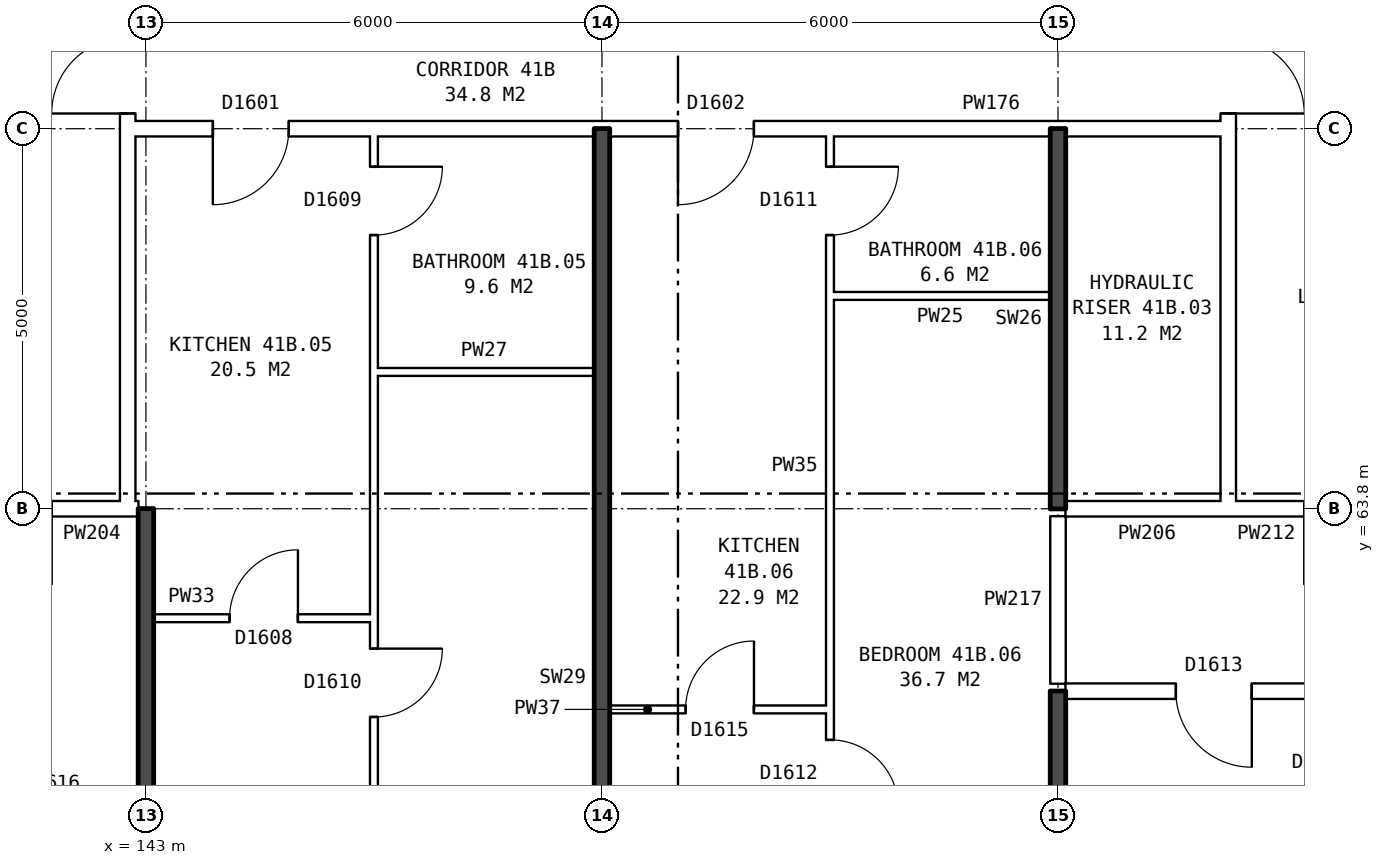
"""IFC4 building model, lengths in metres.
Left out: names, types, materials, properties, quantities, classifications, styles, units other than length and angle.
Written with IfcOpenShell. Run it as: python <this file> out.ifc"""

import sys

from ifc_helpers import new_model, si_unit, direction, frame, frame_2d, origin, place, context, subcontext, project, spatial, rectangle, extrude, element, fill, save


model = new_model("IFC4")
c1 = context("Model", 3, precision=1e-05, world=origin(), true_north=direction((0.0, 1.0)))
c2 = subcontext(c1, "Body", "Model", "MODEL_VIEW")
j1 = project(units=[si_unit("LENGTHUNIT", "METRE"), si_unit("PLANEANGLEUNIT", "RADIAN")], contexts=[c1])
p1 = place(None, origin())
s1 = spatial("IfcSite", under=j1, at=p1, CompositionType="ELEMENT")
p2 = place(p1, origin())
s2 = spatial("IfcBuilding", under=s1, at=p2, CompositionType="ELEMENT")
p3 = place(p2, frame((0.0, 0.0, 148.5)))
s3 = spatial("IfcBuildingStorey", under=s2, at=p3, CompositionType="ELEMENT", Elevation=148.5)
p4 = place(p3, frame((142.76, 63.9, 0.0), z_axis=(0.0, 0.0, 1.0), x_axis=(0.0, 1.0, 0.0)))
e1 = element("IfcWall", 1, at=p4, inside=s3, PredefinedType="PARTITIONING", context=c2, shape_type="SweptSolid", body=[
    extrude(rectangle(XDim=12.2, YDim=0.2, at=frame_2d((6.1, 0.0))), origin(), (0.0, 0.0, 1.0), 2.85),
])
p5 = place(p4, frame((5.1, 0.0, 0.0)))
e2 = element("IfcOpeningElement", 2, at=p5, cuts=e1, PredefinedType="OPENING", context=c2, shape_type="SweptSolid", body=[
    extrude(rectangle(XDim=2.0, YDim=2.1, at=frame_2d((1.0, 1.05))), frame((0.0, 0.11, 0.0), z_axis=(0.0, -1.0, 0.0), x_axis=(1.0, 0.0, 0.0)), (0.0, 0.0, 1.0), 0.22),
])
p6 = place(p3, frame((157.24, 63.9, 0.0), z_axis=(0.0, 0.0, 1.0), x_axis=(0.0, 1.0, 0.0)))
e3 = element("IfcWall", 3, at=p6, inside=s3, PredefinedType="PARTITIONING", context=c2, shape_type="SweptSolid", body=[
    extrude(rectangle(XDim=12.2, YDim=0.2, at=frame_2d((6.1, 0.0))), origin(), (0.0, 0.0, 1.0), 2.85),
])
p7 = place(p6, frame((5.1, 0.0, 0.0)))
e4 = element("IfcOpeningElement", 4, at=p7, cuts=e3, PredefinedType="OPENING", context=c2, shape_type="SweptSolid", body=[
    extrude(rectangle(XDim=2.0, YDim=2.1, at=frame_2d((1.0, 1.05))), frame((0.0, 0.11, 0.0), z_axis=(0.0, -1.0, 0.0), x_axis=(1.0, 0.0, 0.0)), (0.0, 0.0, 1.0), 0.22),
])
p8 = place(p3, frame((149.1, 61.16, 0.0), z_axis=(0.0, 0.0, 1.0), x_axis=(1.0, 0.0, 0.0)))
e5 = element("IfcWall", 5, at=p8, inside=s3, PredefinedType="PARTITIONING", context=c2, shape_type="SweptSolid", body=[
    extrude(rectangle(XDim=2.9, YDim=0.1, at=frame_2d((1.45, 0.0))), origin(), (0.0, 0.0, 1.0), 2.85),
])
p9 = place(p8, frame((1.0, 0.0, 0.0)))
e6 = element("IfcOpeningElement", 6, at=p9, cuts=e5, PredefinedType="OPENING", context=c2, shape_type="SweptSolid", body=[
    extrude(rectangle(XDim=0.9, YDim=2.1, at=frame_2d((0.45, 1.05))), frame((0.0, 0.06, 0.0), z_axis=(0.0, -1.0, 0.0), x_axis=(1.0, 0.0, 0.0)), (0.0, 0.0, 1.0), 0.12),
])
p10 = place(p3, frame((155.1, 61.4, 0.0), z_axis=(0.0, 0.0, 1.0), x_axis=(1.0, 0.0, 0.0)))
e7 = element("IfcWall", 7, at=p10, inside=s3, PredefinedType="PARTITIONING", context=c2, shape_type="SweptSolid", body=[
    extrude(rectangle(XDim=16.04, YDim=0.2, at=frame_2d((8.02, 0.0))), origin(), (0.0, 0.0, 1.0), 2.85),
])
p11 = place(p10, frame((1.45, 0.0, 0.0)))
e8 = element("IfcOpeningElement", 8, at=p11, cuts=e7, PredefinedType="OPENING", context=c2, shape_type="SweptSolid", body=[
    extrude(rectangle(XDim=1.0, YDim=2.1, at=frame_2d((0.5, 1.05))), frame((0.0, 0.11, 0.0), z_axis=(0.0, -1.0, 0.0), x_axis=(1.0, 0.0, 0.0)), (0.0, 0.0, 1.0), 0.22),
])
p12 = place(p10, frame((8.4, 0.0, 0.0)))
e9 = element("IfcOpeningElement", 9, at=p12, cuts=e7, PredefinedType="OPENING", context=c2, shape_type="SweptSolid", body=[
    extrude(rectangle(XDim=1.0, YDim=2.1, at=frame_2d((0.5, 1.05))), frame((0.0, 0.11, 0.0), z_axis=(0.0, -1.0, 0.0), x_axis=(1.0, 0.0, 0.0)), (0.0, 0.0, 1.0), 0.22),
])
p13 = place(p3, frame((143.1, 62.36, 0.0), z_axis=(0.0, 0.0, 1.0), x_axis=(1.0, 0.0, 0.0)))
e10 = element("IfcWall", 10, at=p13, inside=s3, PredefinedType="PARTITIONING", context=c2, shape_type="SweptSolid", body=[
    extrude(rectangle(XDim=2.9, YDim=0.1, at=frame_2d((1.45, 0.0))), origin(), (0.0, 0.0, 1.0), 2.85),
])
p14 = place(p13, frame((1.0, 0.0, 0.0)))
e11 = element("IfcOpeningElement", 11, at=p14, cuts=e10, PredefinedType="OPENING", context=c2, shape_type="SweptSolid", body=[
    extrude(rectangle(XDim=0.9, YDim=2.1, at=frame_2d((0.45, 1.05))), frame((0.0, 0.06, 0.0), z_axis=(0.0, -1.0, 0.0), x_axis=(1.0, 0.0, 0.0)), (0.0, 0.0, 1.0), 0.12),
])
p15 = place(p3, frame((139.76, 63.8, 0.0), z_axis=(0.0, 0.0, 1.0), x_axis=(1.0, 0.0, 0.0)))
e12 = element("IfcWall", 12, at=p15, inside=s3, PredefinedType="PARTITIONING", context=c2, shape_type="SweptSolid", body=[
    extrude(rectangle(XDim=3.0, YDim=0.2, at=frame_2d((1.5, 0.0))), origin(), (0.0, 0.0, 1.0), 2.85),
])
p16 = place(p15, frame((1.0, 0.0, 0.0)))
e13 = element("IfcOpeningElement", 13, at=p16, cuts=e12, PredefinedType="OPENING", context=c2, shape_type="SweptSolid", body=[
    extrude(rectangle(XDim=1.0, YDim=2.1, at=frame_2d((0.5, 1.05))), frame((0.0, 0.11, 0.0), z_axis=(0.0, -1.0, 0.0), x_axis=(1.0, 0.0, 0.0)), (0.0, 0.0, 1.0), 0.22),
])
p17 = place(p3, frame((142.76, 63.8, 0.0), z_axis=(0.0, 0.0, 1.0), x_axis=(1.0, 0.0, 0.0)))
e14 = element("IfcWall", 14, at=p17, inside=s3, PredefinedType="PARTITIONING", context=c2, shape_type="SweptSolid", body=[
    extrude(rectangle(XDim=0.14, YDim=0.2, at=frame_2d((0.07, 0.0))), origin(), (0.0, 0.0, 1.0), 2.85),
])
p18 = place(p3, frame((155.1, 63.8, 0.0), z_axis=(0.0, 0.0, 1.0), x_axis=(1.0, 0.0, 0.0)))
e15 = element("IfcWall", 15, at=p18, inside=s3, PredefinedType="PARTITIONING", context=c2, shape_type="SweptSolid", body=[
    extrude(rectangle(XDim=2.14, YDim=0.2, at=frame_2d((1.07, 0.0))), origin(), (0.0, 0.0, 1.0), 2.85),
])
p19 = place(p3, frame((157.24, 63.8, 0.0), z_axis=(0.0, 0.0, 1.0), x_axis=(1.0, 0.0, 0.0)))
e16 = element("IfcWall", 16, at=p19, inside=s3, PredefinedType="PARTITIONING", context=c2, shape_type="SweptSolid", body=[
    extrude(rectangle(XDim=3.0, YDim=0.2, at=frame_2d((1.5, 0.0))), origin(), (0.0, 0.0, 1.0), 2.85),
])
p20 = place(p19, frame((1.0, 0.0, 0.0)))
e17 = element("IfcOpeningElement", 17, at=p20, cuts=e16, PredefinedType="OPENING", context=c2, shape_type="SweptSolid", body=[
    extrude(rectangle(XDim=1.0, YDim=2.1, at=frame_2d((0.5, 1.05))), frame((0.0, 0.11, 0.0), z_axis=(0.0, -1.0, 0.0), x_axis=(1.0, 0.0, 0.0)), (0.0, 0.0, 1.0), 0.22),
])
for number, where, z_axis, x_axis in (
    (18, (146.0, 65.6, 0.0), (0.0, 0.0, 1.0), (1.0, 0.0, 0.0)),
    (19, (152.0, 66.6, 0.0), (0.0, 0.0, 1.0), (1.0, 0.0, 0.0)),
):
    element("IfcWall", number, at=place(p3, frame(where, z_axis=z_axis, x_axis=x_axis)), inside=s3, PredefinedType="PARTITIONING", context=c2, shape_type="SweptSolid", body=[
        extrude(rectangle(XDim=2.9, YDim=0.1, at=frame_2d((1.45, 0.0))), origin(), (0.0, 0.0, 1.0), 2.85),
    ])
p21 = place(p3, frame((142.76, 68.8, 0.0), z_axis=(0.0, 0.0, 1.0), x_axis=(1.0, 0.0, 0.0)))
e20 = element("IfcWall", 20, at=p21, inside=s3, PredefinedType="PARTITIONING", context=c2, shape_type="SweptSolid", body=[
    extrude(rectangle(XDim=14.48, YDim=0.2, at=frame_2d((7.24, 0.0))), origin(), (0.0, 0.0, 1.0), 2.85),
])
p22 = place(p21, frame((1.12, 0.0, 0.0)))
e21 = element("IfcOpeningElement", 21, at=p22, cuts=e20, PredefinedType="OPENING", context=c2, shape_type="SweptSolid", body=[
    extrude(rectangle(XDim=1.0, YDim=2.1, at=frame_2d((0.5, 1.05))), frame((0.0, 0.11, 0.0), z_axis=(0.0, -1.0, 0.0), x_axis=(1.0, 0.0, 0.0)), (0.0, 0.0, 1.0), 0.22),
])
p23 = place(p21, frame((7.24, 0.0, 0.0)))
e22 = element("IfcOpeningElement", 22, at=p23, cuts=e20, PredefinedType="OPENING", context=c2, shape_type="SweptSolid", body=[
    extrude(rectangle(XDim=1.0, YDim=2.1, at=frame_2d((0.5, 1.05))), frame((0.0, 0.11, 0.0), z_axis=(0.0, -1.0, 0.0), x_axis=(1.0, 0.0, 0.0)), (0.0, 0.0, 1.0), 0.22),
])
p24 = place(p3, frame((143.0, 54.36, 0.0), z_axis=(0.0, 0.0, 1.0), x_axis=(0.0, 1.0, 0.0)))
e23 = element("IfcWall", 23, at=p24, inside=s3, PredefinedType="SOLIDWALL", context=c2, shape_type="SweptSolid", body=[
    extrude(rectangle(XDim=9.44, YDim=0.2, at=frame_2d((4.72, 0.0))), origin(), (0.0, 0.0, 1.0), 2.85),
])
p25 = place(p3, frame((146.0, 54.36, 0.0), z_axis=(0.0, 0.0, 1.0), x_axis=(0.0, 1.0, 0.0)))
e24 = element("IfcWall", 24, at=p25, inside=s3, PredefinedType="PARTITIONING", context=c2, shape_type="SweptSolid", body=[
    extrude(rectangle(XDim=14.34, YDim=0.1, at=frame_2d((7.17, 0.0))), origin(), (0.0, 0.0, 1.0), 2.85),
])
p26 = place(p25, frame((6.7, 0.0, 0.0)))
e25 = element("IfcOpeningElement", 25, at=p26, cuts=e24, PredefinedType="OPENING", context=c2, shape_type="SweptSolid", body=[
    extrude(rectangle(XDim=0.9, YDim=2.1, at=frame_2d((0.45, 1.05))), frame((0.0, 0.06, 0.0), z_axis=(0.0, -1.0, 0.0), x_axis=(1.0, 0.0, 0.0)), (0.0, 0.0, 1.0), 0.12),
])
p27 = place(p25, frame((13.04, 0.0, 0.0)))
e26 = element("IfcOpeningElement", 26, at=p27, cuts=e24, PredefinedType="OPENING", context=c2, shape_type="SweptSolid", body=[
    extrude(rectangle(XDim=0.9, YDim=2.1, at=frame_2d((0.45, 1.05))), frame((0.0, 0.06, 0.0), z_axis=(0.0, -1.0, 0.0), x_axis=(1.0, 0.0, 0.0)), (0.0, 0.0, 1.0), 0.12),
])
p28 = place(p3, frame((149.0, 54.36, 0.0), z_axis=(0.0, 0.0, 1.0), x_axis=(0.0, 1.0, 0.0)))
e27 = element("IfcWall", 27, at=p28, inside=s3, PredefinedType="SOLIDWALL", context=c2, shape_type="SweptSolid", body=[
    extrude(rectangle(XDim=14.44, YDim=0.2, at=frame_2d((7.22, 0.0))), origin(), (0.0, 0.0, 1.0), 2.85),
])
p29 = place(p3, frame((152.0, 54.36, 0.0), z_axis=(0.0, 0.0, 1.0), x_axis=(0.0, 1.0, 0.0)))
e28 = element("IfcWall", 28, at=p29, inside=s3, PredefinedType="PARTITIONING", context=c2, shape_type="SweptSolid", body=[
    extrude(rectangle(XDim=14.34, YDim=0.1, at=frame_2d((7.17, 0.0))), origin(), (0.0, 0.0, 1.0), 2.85),
])
p30 = place(p29, frame((5.5, 0.0, 0.0)))
e29 = element("IfcOpeningElement", 29, at=p30, cuts=e28, PredefinedType="OPENING", context=c2, shape_type="SweptSolid", body=[
    extrude(rectangle(XDim=0.9, YDim=2.1, at=frame_2d((0.45, 1.05))), frame((0.0, 0.06, 0.0), z_axis=(0.0, -1.0, 0.0), x_axis=(1.0, 0.0, 0.0)), (0.0, 0.0, 1.0), 0.12),
])
p31 = place(p29, frame((13.04, 0.0, 0.0)))
e30 = element("IfcOpeningElement", 30, at=p31, cuts=e28, PredefinedType="OPENING", context=c2, shape_type="SweptSolid", body=[
    extrude(rectangle(XDim=0.9, YDim=2.1, at=frame_2d((0.45, 1.05))), frame((0.0, 0.06, 0.0), z_axis=(0.0, -1.0, 0.0), x_axis=(1.0, 0.0, 0.0)), (0.0, 0.0, 1.0), 0.12),
])
p32 = place(p3, frame((155.0, 54.36, 0.0), z_axis=(0.0, 0.0, 1.0), x_axis=(0.0, 1.0, 0.0)))
e31 = element("IfcWall", 31, at=p32, inside=s3, PredefinedType="SOLIDWALL", context=c2, shape_type="SweptSolid", body=[
    extrude(rectangle(XDim=7.04, YDim=0.2, at=frame_2d((3.52, 0.0))), origin(), (0.0, 0.0, 1.0), 2.85),
])
p33 = place(p3, frame((155.0, 61.5, 0.0), z_axis=(0.0, 0.0, 1.0), x_axis=(0.0, 1.0, 0.0)))
e32 = element("IfcWall", 32, at=p33, inside=s3, PredefinedType="PARTITIONING", context=c2, shape_type="SweptSolid", body=[
    extrude(rectangle(XDim=2.2, YDim=0.2, at=frame_2d((1.1, 0.0))), origin(), (0.0, 0.0, 1.0), 2.85),
])
p34 = place(p3, frame((155.0, 63.8, 0.0), z_axis=(0.0, 0.0, 1.0), x_axis=(0.0, 1.0, 0.0)))
e33 = element("IfcWall", 33, at=p34, inside=s3, PredefinedType="SOLIDWALL", context=c2, shape_type="SweptSolid", body=[
    extrude(rectangle(XDim=5.0, YDim=0.2, at=frame_2d((2.5, 0.0))), origin(), (0.0, 0.0, 1.0), 2.85),
])
p35 = place(p5, origin())
e34 = element("IfcDoor", 34, at=p35, inside=s3, OperationType="DOUBLE_DOOR_SINGLE_SWING", PredefinedType="DOOR", context=c2, shape_type="SweptSolid", body=[
    extrude(rectangle(XDim=2.0, YDim=2.1, at=frame_2d((1.0, 1.05))), frame((0.0, 0.025, 0.0), z_axis=(0.0, -1.0, 0.0), x_axis=(1.0, 0.0, 0.0)), (0.0, 0.0, 1.0), 0.05),
])
fill(e2, e34)
p36 = place(p7, frame((2.0, 0.0, 0.0), z_axis=(0.0, 0.0, 1.0), x_axis=(-1.0, 0.0, 0.0)))
e35 = element("IfcDoor", 35, at=p36, inside=s3, OperationType="DOUBLE_DOOR_SINGLE_SWING", PredefinedType="DOOR", context=c2, shape_type="SweptSolid", body=[
    extrude(rectangle(XDim=2.0, YDim=2.1, at=frame_2d((1.0, 1.05))), frame((0.0, 0.025, 0.0), z_axis=(0.0, -1.0, 0.0), x_axis=(1.0, 0.0, 0.0)), (0.0, 0.0, 1.0), 0.05),
])
fill(e4, e35)
p37 = place(p26, frame((0.9, 0.0, 0.0), z_axis=(0.0, 0.0, 1.0), x_axis=(-1.0, 0.0, 0.0)))
e36 = element("IfcDoor", 36, at=p37, inside=s3, OperationType="SINGLE_SWING_LEFT", PredefinedType="DOOR", context=c2, shape_type="SweptSolid", body=[
    extrude(rectangle(XDim=0.9, YDim=2.1, at=frame_2d((0.45, 1.05))), frame((0.0, 0.025, 0.0), z_axis=(0.0, -1.0, 0.0), x_axis=(1.0, 0.0, 0.0)), (0.0, 0.0, 1.0), 0.05),
])
fill(e25, e36)
p38 = place(p22, frame((1.0, 0.0, 0.0), z_axis=(0.0, 0.0, 1.0), x_axis=(-1.0, 0.0, 0.0)))
e37 = element("IfcDoor", 37, at=p38, inside=s3, OperationType="SINGLE_SWING_RIGHT", PredefinedType="DOOR", context=c2, shape_type="SweptSolid", body=[
    extrude(rectangle(XDim=1.0, YDim=2.1, at=frame_2d((0.5, 1.05))), frame((0.0, 0.025, 0.0), z_axis=(0.0, -1.0, 0.0), x_axis=(1.0, 0.0, 0.0)), (0.0, 0.0, 1.0), 0.05),
])
fill(e21, e37)
p39 = place(p14, origin())
e38 = element("IfcDoor", 38, at=p39, inside=s3, OperationType="SINGLE_SWING_RIGHT", PredefinedType="DOOR", context=c2, shape_type="SweptSolid", body=[
    extrude(rectangle(XDim=0.9, YDim=2.1, at=frame_2d((0.45, 1.05))), frame((0.0, 0.025, 0.0), z_axis=(0.0, -1.0, 0.0), x_axis=(1.0, 0.0, 0.0)), (0.0, 0.0, 1.0), 0.05),
])
fill(e11, e38)
p40 = place(p27, frame((0.9, 0.0, 0.0), z_axis=(0.0, 0.0, 1.0), x_axis=(-1.0, 0.0, 0.0)))
e39 = element("IfcDoor", 39, at=p40, inside=s3, OperationType="SINGLE_SWING_LEFT", PredefinedType="DOOR", context=c2, shape_type="SweptSolid", body=[
    extrude(rectangle(XDim=0.9, YDim=2.1, at=frame_2d((0.45, 1.05))), frame((0.0, 0.025, 0.0), z_axis=(0.0, -1.0, 0.0), x_axis=(1.0, 0.0, 0.0)), (0.0, 0.0, 1.0), 0.05),
])
fill(e26, e39)
p41 = place(p30, frame((0.9, 0.0, 0.0), z_axis=(0.0, 0.0, 1.0), x_axis=(-1.0, 0.0, 0.0)))
e40 = element("IfcDoor", 40, at=p41, inside=s3, OperationType="SINGLE_SWING_RIGHT", PredefinedType="DOOR", context=c2, shape_type="SweptSolid", body=[
    extrude(rectangle(XDim=0.9, YDim=2.1, at=frame_2d((0.45, 1.05))), frame((0.0, 0.025, 0.0), z_axis=(0.0, -1.0, 0.0), x_axis=(1.0, 0.0, 0.0)), (0.0, 0.0, 1.0), 0.05),
])
fill(e29, e40)
p42 = place(p23, frame((1.0, 0.0, 0.0), z_axis=(0.0, 0.0, 1.0), x_axis=(-1.0, 0.0, 0.0)))
e41 = element("IfcDoor", 41, at=p42, inside=s3, OperationType="SINGLE_SWING_RIGHT", PredefinedType="DOOR", context=c2, shape_type="SweptSolid", body=[
    extrude(rectangle(XDim=1.0, YDim=2.1, at=frame_2d((0.5, 1.05))), frame((0.0, 0.025, 0.0), z_axis=(0.0, -1.0, 0.0), x_axis=(1.0, 0.0, 0.0)), (0.0, 0.0, 1.0), 0.05),
])
fill(e22, e41)
p43 = place(p9, origin())
e42 = element("IfcDoor", 42, at=p43, inside=s3, OperationType="SINGLE_SWING_RIGHT", PredefinedType="DOOR", context=c2, shape_type="SweptSolid", body=[
    extrude(rectangle(XDim=0.9, YDim=2.1, at=frame_2d((0.45, 1.05))), frame((0.0, 0.025, 0.0), z_axis=(0.0, -1.0, 0.0), x_axis=(1.0, 0.0, 0.0)), (0.0, 0.0, 1.0), 0.05),
])
fill(e6, e42)
p44 = place(p31, frame((0.9, 0.0, 0.0), z_axis=(0.0, 0.0, 1.0), x_axis=(-1.0, 0.0, 0.0)))
e43 = element("IfcDoor", 43, at=p44, inside=s3, OperationType="SINGLE_SWING_LEFT", PredefinedType="DOOR", context=c2, shape_type="SweptSolid", body=[
    extrude(rectangle(XDim=0.9, YDim=2.1, at=frame_2d((0.45, 1.05))), frame((0.0, 0.025, 0.0), z_axis=(0.0, -1.0, 0.0), x_axis=(1.0, 0.0, 0.0)), (0.0, 0.0, 1.0), 0.05),
])
fill(e30, e43)
p45 = place(p11, frame((1.0, 0.0, 0.0), z_axis=(0.0, 0.0, 1.0), x_axis=(-1.0, 0.0, 0.0)))
e44 = element("IfcDoor", 44, at=p45, inside=s3, OperationType="SINGLE_SWING_LEFT", PredefinedType="DOOR", context=c2, shape_type="SweptSolid", body=[
    extrude(rectangle(XDim=1.0, YDim=2.1, at=frame_2d((0.5, 1.05))), frame((0.0, 0.025, 0.0), z_axis=(0.0, -1.0, 0.0), x_axis=(1.0, 0.0, 0.0)), (0.0, 0.0, 1.0), 0.05),
])
fill(e8, e44)
save(model, sys.argv[1])
